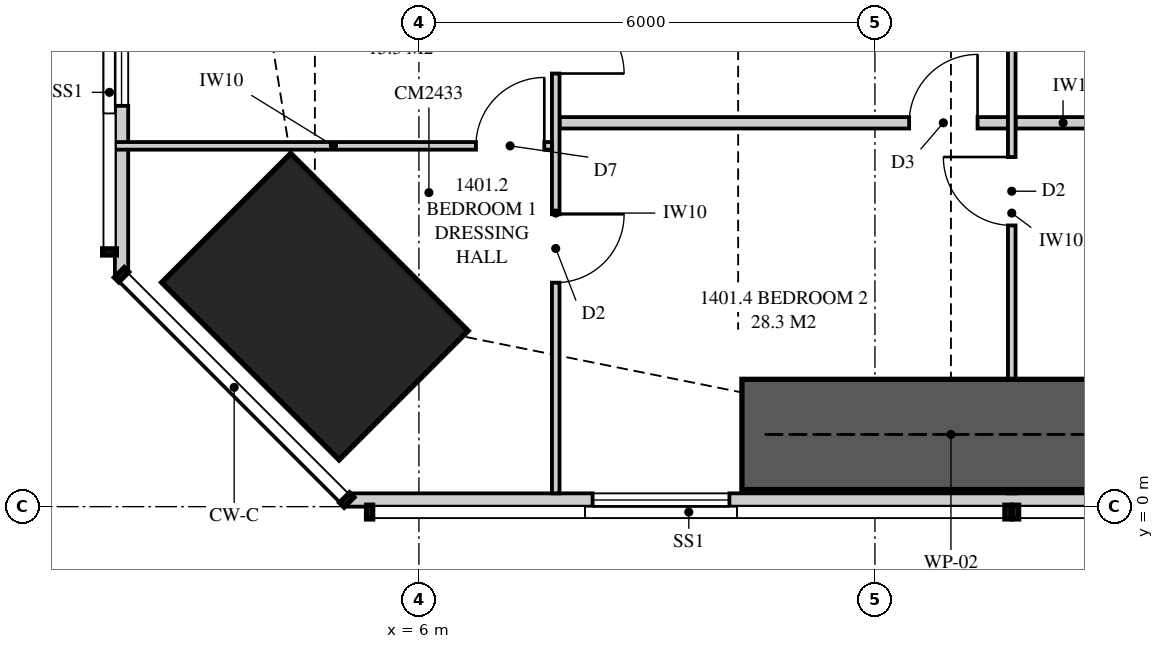
"""IFC4 building model, lengths in metres.
Left out: names, types, materials, properties, quantities, classifications, styles, units other than length and angle.
Written with IfcOpenShell. Run it as: python <this file> out.ifc"""

import sys

from ifc_helpers import new_model, si_unit, direction, frame, frame_2d, origin, origin_2d, place, context, subcontext, project, spatial, polyline, rectangle, outline, extrude, element, fill, save


model = new_model("IFC4")
c1 = context("Model", 3, precision=1e-05, world=origin(), true_north=direction((0.0, 1.0)))
c2 = subcontext(c1, "Body", "Model", "MODEL_VIEW")
j1 = project(units=[si_unit("LENGTHUNIT", "METRE"), si_unit("PLANEANGLEUNIT", "RADIAN")], contexts=[c1])
p1 = place(None, origin())
s1 = spatial("IfcSite", under=j1, at=p1, CompositionType="ELEMENT")
p2 = place(p1, origin())
s2 = spatial("IfcBuilding", under=s1, at=p2, CompositionType="ELEMENT")
p3 = place(p2, frame((0.0, 0.0, 54.5)))
s3 = spatial("IfcBuildingStorey", under=s2, at=p3, CompositionType="ELEMENT", Elevation=54.5)
p4 = place(p3, frame((4.631, 2.631, 0.0), z_axis=(0.0, 0.0, 1.0), x_axis=(0.707106781187, 0.707106781187, 0.0)))
e1 = element("IfcColumn", 1, at=p4, inside=s3, PredefinedType="COLUMN", context=c2, shape_type="SweptSolid", body=[
    extrude(rectangle(XDim=2.4, YDim=3.3, at=origin_2d()), origin(), (0.0, 0.0, 1.0), 3.35),
])
p5 = place(p3, frame((5.051, 0.087, 0.0), z_axis=(0.0, 0.0, 1.0), x_axis=(1.0, 0.0, 0.0)))
e2 = element("IfcWall", 2, at=p5, inside=s3, PredefinedType="SOLIDWALL", context=c2, shape_type="SweptSolid", body=[
    extrude(outline(polyline([(0.0, 0.0), (21.749, 0.0), (21.749, 2.15), (7.949, 2.15), (7.949, 3.11), (7.793, 3.11), (7.793, 2.15), (7.745, 2.15), (7.745, 3.11), (0.0, 3.11), (0.0, 0.0)])), frame((0.0, 0.087, 0.0), z_axis=(0.0, -1.0, 0.0), x_axis=(1.0, 0.0, 0.0)), (0.0, 0.0, 1.0), 0.175),
])
p6 = place(p5, frame((3.234, 0.0, 0.4)))
e3 = element("IfcOpeningElement", 3, at=p6, cuts=e2, PredefinedType="OPENING", context=c2, shape_type="SweptSolid", body=[
    extrude(rectangle(XDim=1.8, YDim=1.7, at=frame_2d((0.9, 0.85))), frame((0.0, 0.097, 0.0), z_axis=(0.0, -1.0, 0.0), x_axis=(1.0, 0.0, 0.0)), (0.0, 0.0, 1.0), 0.195),
])
p7 = place(p5, frame((10.806, 0.0, 0.4)))
e4 = element("IfcOpeningElement", 4, at=p7, cuts=e2, PredefinedType="OPENING", context=c2, shape_type="SweptSolid", body=[
    extrude(rectangle(XDim=1.8, YDim=1.7, at=frame_2d((0.9, 0.85))), frame((0.0, 0.097, 0.0), z_axis=(0.0, -1.0, 0.0), x_axis=(1.0, 0.0, 0.0)), (0.0, 0.0, 1.0), 0.195),
])
p8 = place(p5, frame((13.674, 0.0, 0.4)))
e5 = element("IfcOpeningElement", 5, at=p8, cuts=e2, PredefinedType="OPENING", context=c2, shape_type="SweptSolid", body=[
    extrude(rectangle(XDim=1.8, YDim=1.7, at=frame_2d((0.9, 0.85))), frame((0.0, 0.097, 0.0), z_axis=(0.0, -1.0, 0.0), x_axis=(1.0, 0.0, 0.0)), (0.0, 0.0, 1.0), 0.195),
])
p9 = place(p3, frame((2.087, 16.3, 0.0), z_axis=(0.0, 0.0, 1.0), x_axis=(0.0, -1.0, 0.0)))
e6 = element("IfcWall", 6, at=p9, inside=s3, PredefinedType="SOLIDWALL", context=c2, shape_type="SweptSolid", body=[
    extrude(outline(polyline([(0.0, 0.0), (13.249, 0.0), (13.249, 3.11), (3.519, 3.11), (3.519, 2.15), (3.426, 2.15), (3.426, 3.11), (3.3, 3.11), (3.3, 2.15), (0.0, 2.15), (0.0, 0.0)])), frame((0.0, 0.087, 0.0), z_axis=(0.0, -1.0, 0.0), x_axis=(1.0, 0.0, 0.0)), (0.0, 0.0, 1.0), 0.175),
])
p10 = place(p9, frame((6.175, 0.0, 0.4)))
e7 = element("IfcOpeningElement", 7, at=p10, cuts=e6, PredefinedType="OPENING", context=c2, shape_type="SweptSolid", body=[
    extrude(rectangle(XDim=1.8, YDim=1.7, at=frame_2d((0.9, 0.85))), frame((0.0, 0.097, 0.0), z_axis=(0.0, -1.0, 0.0), x_axis=(1.0, 0.0, 0.0)), (0.0, 0.0, 1.0), 0.195),
])
p11 = place(p9, frame((9.227, 0.0, 0.4)))
e8 = element("IfcOpeningElement", 8, at=p11, cuts=e6, PredefinedType="OPENING", context=c2, shape_type="SweptSolid", body=[
    extrude(rectangle(XDim=1.8, YDim=1.7, at=frame_2d((0.9, 0.85))), frame((0.0, 0.097, 0.0), z_axis=(0.0, -1.0, 0.0), x_axis=(1.0, 0.0, 0.0)), (0.0, 0.0, 1.0), 0.195),
])
p12 = place(p3, frame((7.8, 0.175, 0.0), z_axis=(0.0, 0.0, 1.0), x_axis=(0.0, 1.0, 0.0)))
e9 = element("IfcWall", 9, at=p12, inside=s3, PredefinedType="PARTITIONING", context=c2, shape_type="SweptSolid", body=[
    extrude(outline(polyline([(0.0, 0.0), (7.375, 0.0), (7.375, 3.11), (2.697, 3.11), (2.697, 2.15), (0.943, 2.15), (0.943, 3.11), (0.0, 3.11), (0.0, 0.0)])), frame((0.0, 0.05, 0.0), z_axis=(0.0, -1.0, 0.0), x_axis=(1.0, 0.0, 0.0)), (0.0, 0.0, 1.0), 0.1),
])
p13 = place(p12, frame((2.772, 0.0, 0.0)))
e10 = element("IfcOpeningElement", 10, at=p13, cuts=e9, PredefinedType="OPENING", context=c2, shape_type="SweptSolid", body=[
    extrude(rectangle(XDim=0.9, YDim=2.1, at=frame_2d((0.45, 1.05))), frame((0.0, 0.06, 0.0), z_axis=(0.0, -1.0, 0.0), x_axis=(1.0, 0.0, 0.0)), (0.0, 0.0, 1.0), 0.12),
])
p14 = place(p12, frame((5.523, 0.0, 0.0)))
e11 = element("IfcOpeningElement", 11, at=p14, cuts=e9, PredefinedType="OPENING", context=c2, shape_type="SweptSolid", body=[
    extrude(rectangle(XDim=0.9, YDim=2.1, at=frame_2d((0.45, 1.05))), frame((0.0, 0.06, 0.0), z_axis=(0.0, -1.0, 0.0), x_axis=(1.0, 0.0, 0.0)), (0.0, 0.0, 1.0), 0.12),
])
p15 = place(p3, frame((13.8, 0.175, 0.0), z_axis=(0.0, 0.0, 1.0), x_axis=(0.0, 1.0, 0.0)))
e12 = element("IfcWall", 12, at=p15, inside=s3, PredefinedType="PARTITIONING", context=c2, shape_type="SweptSolid", body=[
    extrude(outline(polyline([(1.635, 2.15), (0.0, 2.15), (0.0, 0.0), (7.375, 0.0), (7.375, 3.11), (1.635, 3.11), (1.635, 2.15)]), holes=[polyline([(1.021, 0.133), (0.529, 0.133), (0.529, 0.923), (1.021, 0.923), (1.021, 0.133)]), polyline([(1.021, 1.227), (0.529, 1.227), (0.529, 2.017), (1.021, 2.017), (1.021, 1.227)])]), frame((0.0, 0.05, 0.0), z_axis=(0.0, -1.0, 0.0), x_axis=(1.0, 0.0, 0.0)), (0.0, 0.0, 1.0), 0.1),
])
p16 = place(p15, frame((3.525, 0.0, 0.0)))
e13 = element("IfcOpeningElement", 13, at=p16, cuts=e12, PredefinedType="OPENING", context=c2, shape_type="SweptSolid", body=[
    extrude(rectangle(XDim=0.9, YDim=2.1, at=frame_2d((0.45, 1.05))), frame((0.0, 0.06, 0.0), z_axis=(0.0, -1.0, 0.0), x_axis=(1.0, 0.0, 0.0)), (0.0, 0.0, 1.0), 0.12),
])
p17 = place(p3, frame((2.0, 4.747, 0.0), z_axis=(0.0, 0.0, 1.0), x_axis=(1.0, 0.0, 0.0)))
e14 = element("IfcWall", 14, at=p17, inside=s3, PredefinedType="PARTITIONING", context=c2, shape_type="SweptSolid", body=[
    extrude(outline(polyline([(0.0, 0.0), (5.75, 0.0), (5.75, 3.11), (3.16, 3.11), (3.16, 2.15), (1.417, 2.15), (1.417, 3.11), (0.0, 3.11), (0.0, 0.0)])), frame((0.0, 0.05, 0.0), z_axis=(0.0, -1.0, 0.0), x_axis=(1.0, 0.0, 0.0)), (0.0, 0.0, 1.0), 0.1),
])
p18 = place(p17, frame((4.75, 0.0, 0.0)))
e15 = element("IfcOpeningElement", 15, at=p18, cuts=e14, PredefinedType="OPENING", context=c2, shape_type="SweptSolid", body=[
    extrude(rectangle(XDim=0.9, YDim=2.1, at=frame_2d((0.45, 1.05))), frame((0.0, 0.06, 0.0), z_axis=(0.0, -1.0, 0.0), x_axis=(1.0, 0.0, 0.0)), (0.0, 0.0, 1.0), 0.12),
])
p19 = place(p3, frame((7.85, 5.05, 0.0), z_axis=(0.0, 0.0, 1.0), x_axis=(1.0, 0.0, 0.0)))
e16 = element("IfcWall", 16, at=p19, inside=s3, PredefinedType="PLUMBINGWALL", context=c2, shape_type="SweptSolid", body=[
    extrude(outline(polyline([(0.0, 0.0), (5.9, 0.0), (5.9, 3.11), (5.462, 3.11), (5.462, 2.541), (4.838, 2.541), (4.838, 3.11), (3.635, 3.11), (3.635, 2.51), (1.065, 2.51), (1.065, 3.11), (0.0, 3.11), (0.0, 0.0)])), frame((0.0, 0.075, 0.0), z_axis=(0.0, -1.0, 0.0), x_axis=(1.0, 0.0, 0.0)), (0.0, 0.0, 1.0), 0.15),
])
p20 = place(p19, frame((4.6, 0.0, 0.0)))
e17 = element("IfcOpeningElement", 17, at=p20, cuts=e16, PredefinedType="OPENING", context=c2, shape_type="SweptSolid", body=[
    extrude(rectangle(XDim=0.9, YDim=2.1, at=frame_2d((0.45, 1.05))), frame((0.0, 0.085, 0.0), z_axis=(0.0, -1.0, 0.0), x_axis=(1.0, 0.0, 0.0)), (0.0, 0.0, 1.0), 0.17),
])
p21 = place(p3, frame((13.85, 5.05, 0.0), z_axis=(0.0, 0.0, 1.0), x_axis=(1.0, 0.0, 0.0)))
e18 = element("IfcWall", 18, at=p21, inside=s3, PredefinedType="PLUMBINGWALL", context=c2, shape_type="SweptSolid", body=[
    extrude(rectangle(XDim=4.2, YDim=0.15, at=frame_2d((2.1, 0.0))), origin(), (0.0, 0.0, 1.0), 3.11),
])
p22 = place(p21, frame((2.9, 0.0, 0.0)))
e19 = element("IfcOpeningElement", 19, at=p22, cuts=e18, PredefinedType="OPENING", context=c2, shape_type="SweptSolid", body=[
    extrude(rectangle(XDim=0.9, YDim=2.1, at=frame_2d((0.45, 1.05))), frame((0.0, 0.085, 0.0), z_axis=(0.0, -1.0, 0.0), x_axis=(1.0, 0.0, 0.0)), (0.0, 0.0, 1.0), 0.17),
])
p23 = place(p3, frame((10.25, 0.95, 0.0), z_axis=(0.0, 0.0, 1.0), x_axis=(1.0, 0.0, 0.0)))
e20 = element("IfcWall", 20, at=p23, inside=s3, PredefinedType="SHEAR", context=c2, shape_type="SweptSolid", body=[
    extrude(rectangle(XDim=5.5, YDim=1.45, at=frame_2d((2.75, 0.0))), origin(), (0.0, 0.0, 1.0), 3.35),
])
p24 = place(p6, origin())
e21 = element("IfcWindow", 21, at=p24, inside=s3, PartitioningType="SINGLE_PANEL", PredefinedType="WINDOW", context=c2, shape_type="SweptSolid", body=[
    extrude(rectangle(XDim=1.8, YDim=1.7, at=frame_2d((0.9, 0.85))), frame((0.0, 0.03, 0.0), z_axis=(0.0, -1.0, 0.0), x_axis=(1.0, 0.0, 0.0)), (0.0, 0.0, 1.0), 0.06),
])
fill(e3, e21)
p25 = place(p11, origin())
e22 = element("IfcWindow", 22, at=p25, inside=s3, PartitioningType="SINGLE_PANEL", PredefinedType="WINDOW", context=c2, shape_type="SweptSolid", body=[
    extrude(rectangle(XDim=1.8, YDim=1.7, at=frame_2d((0.9, 0.85))), frame((0.0, 0.03, 0.0), z_axis=(0.0, -1.0, 0.0), x_axis=(1.0, 0.0, 0.0)), (0.0, 0.0, 1.0), 0.06),
])
fill(e8, e22)
p26 = place(p18, origin())
e23 = element("IfcDoor", 23, at=p26, inside=s3, OperationType="SINGLE_SWING_RIGHT", PredefinedType="DOOR", context=c2, shape_type="SweptSolid", body=[
    extrude(rectangle(XDim=0.9, YDim=2.1, at=frame_2d((0.45, 1.05))), frame((0.0, 0.025, 0.0), z_axis=(0.0, -1.0, 0.0), x_axis=(1.0, 0.0, 0.0)), (0.0, 0.0, 1.0), 0.05),
])
fill(e15, e23)
p27 = place(p13, frame((0.9, 0.0, 0.0), z_axis=(0.0, 0.0, 1.0), x_axis=(-1.0, 0.0, 0.0)))
e24 = element("IfcDoor", 24, at=p27, inside=s3, OperationType="SINGLE_SWING_LEFT", PredefinedType="DOOR", context=c2, shape_type="SweptSolid", body=[
    extrude(rectangle(XDim=0.9, YDim=2.1, at=frame_2d((0.45, 1.05))), frame((0.0, 0.025, 0.0), z_axis=(0.0, -1.0, 0.0), x_axis=(1.0, 0.0, 0.0)), (0.0, 0.0, 1.0), 0.05),
])
fill(e10, e24)
p28 = place(p16, origin())
e25 = element("IfcDoor", 25, at=p28, inside=s3, OperationType="SINGLE_SWING_RIGHT", PredefinedType="DOOR", context=c2, shape_type="SweptSolid", body=[
    extrude(rectangle(XDim=0.9, YDim=2.1, at=frame_2d((0.45, 1.05))), frame((0.0, 0.025, 0.0), z_axis=(0.0, -1.0, 0.0), x_axis=(1.0, 0.0, 0.0)), (0.0, 0.0, 1.0), 0.05),
])
fill(e13, e25)
p29 = place(p20, origin())
e26 = element("IfcDoor", 26, at=p29, inside=s3, OperationType="SINGLE_SWING_RIGHT", PredefinedType="DOOR", context=c2, shape_type="SweptSolid", body=[
    extrude(rectangle(XDim=0.9, YDim=2.1, at=frame_2d((0.45, 1.05))), frame((0.0, 0.025, 0.0), z_axis=(0.0, -1.0, 0.0), x_axis=(1.0, 0.0, 0.0)), (0.0, 0.0, 1.0), 0.05),
])
fill(e17, e26)
p30 = place(p14, frame((0.9, 0.0, 0.0), z_axis=(0.0, 0.0, 1.0), x_axis=(-1.0, 0.0, 0.0)))
e27 = element("IfcDoor", 27, at=p30, inside=s3, OperationType="SINGLE_SWING_RIGHT", PredefinedType="DOOR", context=c2, shape_type="SweptSolid", body=[
    extrude(rectangle(XDim=0.9, YDim=2.1, at=frame_2d((0.45, 1.05))), frame((0.0, 0.025, 0.0), z_axis=(0.0, -1.0, 0.0), x_axis=(1.0, 0.0, 0.0)), (0.0, 0.0, 1.0), 0.05),
])
fill(e11, e27)
save(model, sys.argv[1])
